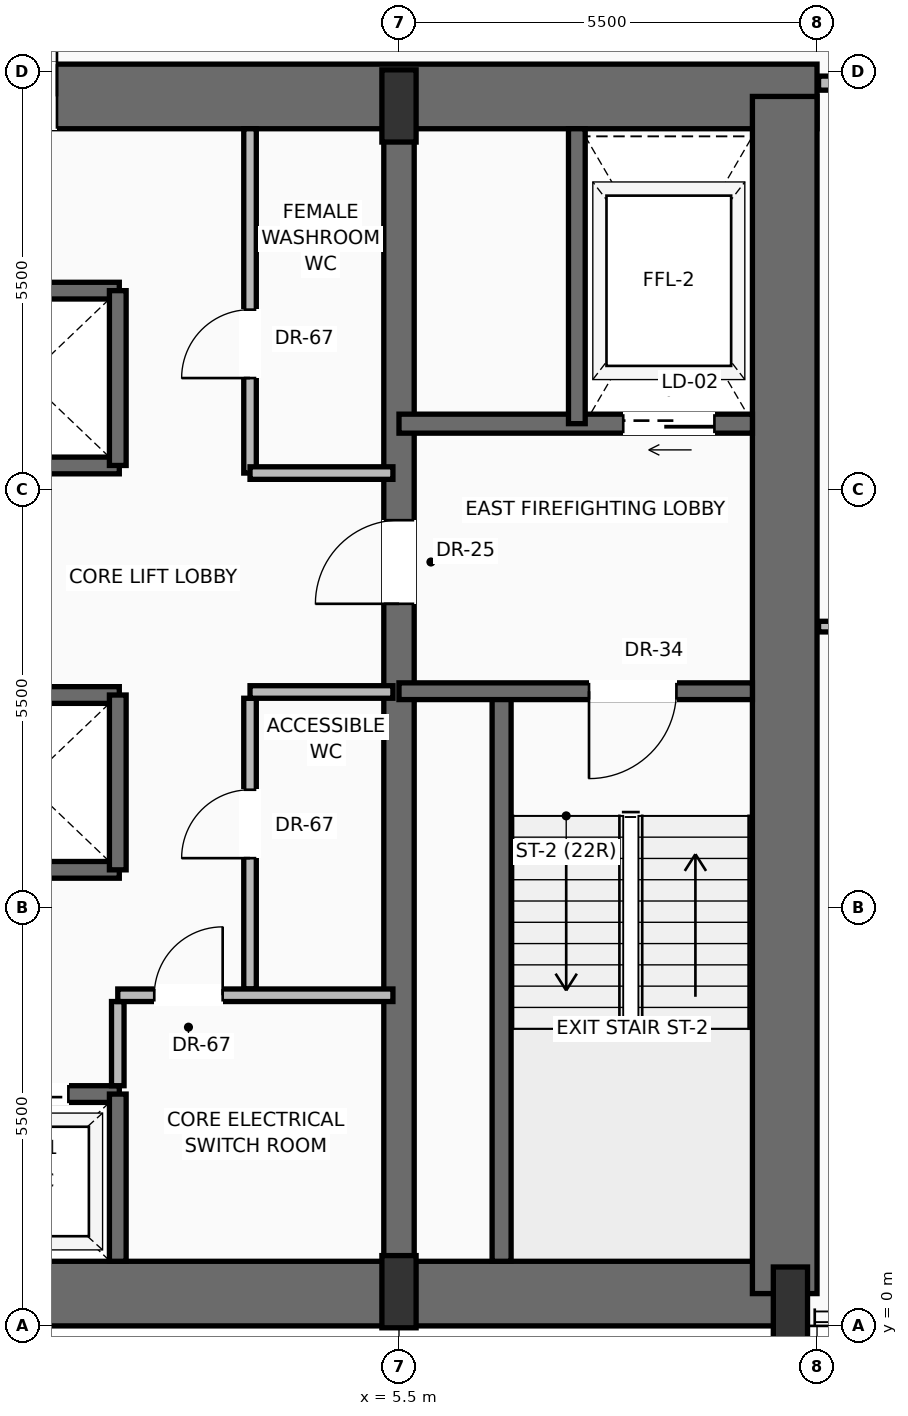
"""IFC4 building model, lengths in metres.
Left out: names, types, materials, properties, quantities, classifications, styles, units other than length and angle.
Written with IfcOpenShell. Run it as: python <this file> out.ifc"""

import sys

from ifc_helpers import new_model, si_unit, direction, frame, frame_2d, origin, origin_2d, place, context, subcontext, project, spatial, rectangle, extrude, source, transform, mapped, element, fill, save


model = new_model("IFC4")
c1 = context("Model", 3, precision=1e-05, world=origin(), true_north=direction((0.0, 1.0)))
c2 = subcontext(c1, "Body", "Model", "MODEL_VIEW")
j1 = project(units=[si_unit("LENGTHUNIT", "METRE"), si_unit("PLANEANGLEUNIT", "RADIAN")], contexts=[c1])
p1 = place(None, origin())
s1 = spatial("IfcSite", under=j1, at=p1, CompositionType="ELEMENT")
p2 = place(p1, origin())
s2 = spatial("IfcBuilding", under=s1, at=p2, CompositionType="ELEMENT")
p3 = place(p2, frame((0.0, 0.0, 64.5)))
s3 = spatial("IfcBuildingStorey", under=s2, at=p3, CompositionType="ELEMENT", Elevation=64.5)
p4 = place(p3, frame((-10.65, 0.425, 0.0), z_axis=(0.0, 0.0, 1.0), x_axis=(1.0, 0.0, 0.0)))
e1 = element("IfcWall", 1, at=p4, inside=s3, PredefinedType="SHEAR", context=c2, shape_type="SweptSolid", body=[
    extrude(rectangle(XDim=21.3, YDim=0.85, at=frame_2d((10.65, 0.0))), origin(), (0.0, 0.0, 1.0), 3.45),
])
p5 = place(p3, frame((-11.0, 16.175, 0.0), z_axis=(0.0, 0.0, 1.0), x_axis=(1.0, 0.0, 0.0)))
e2 = element("IfcWall", 2, at=p5, inside=s3, PredefinedType="SHEAR", context=c2, shape_type="SweptSolid", body=[
    extrude(rectangle(XDim=22.0, YDim=0.85, at=frame_2d((11.0, 0.0))), origin(), (0.0, 0.0, 1.0), 3.45),
])
p6 = place(p5, frame((3.57, 0.0, 0.0)))
e3 = element("IfcOpeningElement", 3, at=p6, cuts=e2, PredefinedType="OPENING", context=c2, shape_type="SweptSolid", body=[
    extrude(rectangle(XDim=1.3, YDim=2.3, at=frame_2d((0.65, 1.15))), frame((0.0, 0.435, 0.0), z_axis=(0.0, -1.0, 0.0), x_axis=(1.0, 0.0, 0.0)), (0.0, 0.0, 1.0), 0.87),
])
p7 = place(p5, frame((10.0, 0.0, 0.0)))
e4 = element("IfcOpeningElement", 4, at=p7, cuts=e2, PredefinedType="OPENING", context=c2, shape_type="SweptSolid", body=[
    extrude(rectangle(XDim=2.0, YDim=2.4, at=frame_2d((1.0, 1.2))), frame((0.0, 0.435, 0.0), z_axis=(0.0, -1.0, 0.0), x_axis=(1.0, 0.0, 0.0)), (0.0, 0.0, 1.0), 0.87),
])
p8 = place(p3, frame((10.575, 0.425, 0.0), z_axis=(0.0, 0.0, 1.0), x_axis=(0.0, 1.0, 0.0)))
e5 = element("IfcWall", 5, at=p8, inside=s3, PredefinedType="SHEAR", context=c2, shape_type="SweptSolid", body=[
    extrude(rectangle(XDim=15.75, YDim=0.85, at=frame_2d((7.875, 0.0))), origin(), (0.0, 0.0, 1.0), 3.45),
])
p9 = place(p3, frame((5.5, 0.425, 0.0), z_axis=(0.0, 0.0, 1.0), x_axis=(0.0, 1.0, 0.0)))
e6 = element("IfcWall", 6, at=p9, inside=s3, PredefinedType="SHEAR", context=c2, shape_type="SweptSolid", body=[
    extrude(rectangle(XDim=15.75, YDim=0.4, at=frame_2d((7.875, 0.0))), origin(), (0.0, 0.0, 1.0), 3.45),
])
p10 = place(p9, frame((9.075, 0.0, 0.0)))
e7 = element("IfcOpeningElement", 7, at=p10, cuts=e6, PredefinedType="OPENING", context=c2, shape_type="SweptSolid", body=[
    extrude(rectangle(XDim=1.1, YDim=2.2, at=frame_2d((0.55, 1.1))), frame((0.0, 0.21, 0.0), z_axis=(0.0, -1.0, 0.0), x_axis=(1.0, 0.0, 0.0)), (0.0, 0.0, 1.0), 0.42),
])
m1 = source(origin(), c2, "Body", "SweptSolid", [
    extrude(rectangle(XDim=0.45, YDim=0.95, at=origin_2d()), origin(), (0.0, 0.0, 1.0), 3.7),
])
for number, where, z_axis, x_axis in (
    (8, (5.5, 0.45, 0.0), (0.0, 0.0, 1.0), (1.0, 0.0, 0.0)),
    (9, (10.65, 0.3, 0.0), (0.0, 0.0, 1.0), (1.0, 0.0, 0.0)),
    (10, (5.5, 16.05, 0.0), (0.0, 0.0, 1.0), (1.0, 0.0, 0.0)),
):
    element("IfcColumn", number, at=place(p3, frame(where, z_axis=z_axis, x_axis=x_axis)), inside=s3, PredefinedType="PILASTER", context=c2, shape_type="MappedRepresentation", body=[
        mapped(m1, transform((0.0, 0.0, 0.0), scale=1.0)),
    ])
p11 = place(p3, frame((6.85, 0.85, 0.0), z_axis=(0.0, 0.0, 1.0), x_axis=(0.0, 1.0, 0.0)))
e11 = element("IfcWall", 11, at=p11, inside=s3, PredefinedType="SOLIDWALL", context=c2, shape_type="SweptSolid", body=[
    extrude(rectangle(XDim=7.5, YDim=0.25, at=frame_2d((3.75, 0.0))), origin(), (0.0, 0.0, 1.0), 3.45),
])
p12 = place(p3, frame((10.15, 8.35, 0.0), z_axis=(0.0, 0.0, 1.0), x_axis=(-1.0, 0.0, 0.0)))
e12 = element("IfcWall", 12, at=p12, inside=s3, PredefinedType="SOLIDWALL", context=c2, shape_type="SweptSolid", body=[
    extrude(rectangle(XDim=4.65, YDim=0.22, at=frame_2d((2.325, 0.0))), origin(), (0.0, 0.0, 1.0), 3.45),
])
p13 = place(p12, frame((1.0, 0.0, 0.0)))
e13 = element("IfcOpeningElement", 13, at=p13, cuts=e12, PredefinedType="OPENING", context=c2, shape_type="SweptSolid", body=[
    extrude(rectangle(XDim=1.15, YDim=2.2, at=frame_2d((0.575, 1.1))), frame((0.0, 0.12, 0.0), z_axis=(0.0, -1.0, 0.0), x_axis=(1.0, 0.0, 0.0)), (0.0, 0.0, 1.0), 0.24),
])
p14 = place(p3, frame((10.15, 11.87, 0.0), z_axis=(0.0, 0.0, 1.0), x_axis=(-1.0, 0.0, 0.0)))
e14 = element("IfcWall", 14, at=p14, inside=s3, PredefinedType="SOLIDWALL", context=c2, shape_type="SweptSolid", body=[
    extrude(rectangle(XDim=4.65, YDim=0.25, at=frame_2d((2.325, 0.0))), origin(), (0.0, 0.0, 1.0), 3.45),
])
p15 = place(p14, frame((0.5, 0.0, 0.0)))
e15 = element("IfcOpeningElement", 15, at=p15, cuts=e14, PredefinedType="OPENING", context=c2, shape_type="SweptSolid", body=[
    extrude(rectangle(XDim=1.2, YDim=2.25, at=frame_2d((0.6, 1.125))), frame((0.0, 0.135, 0.0), z_axis=(0.0, -1.0, 0.0), x_axis=(1.0, 0.0, 0.0)), (0.0, 0.0, 1.0), 0.27),
])
p16 = place(p3, frame((7.84, 11.87, 0.0), z_axis=(0.0, 0.0, 1.0), x_axis=(0.0, 1.0, 0.0)))
e16 = element("IfcWall", 16, at=p16, inside=s3, PredefinedType="SOLIDWALL", context=c2, shape_type="SweptSolid", body=[
    extrude(rectangle(XDim=3.88, YDim=0.22, at=frame_2d((1.94, 0.0))), origin(), (0.0, 0.0, 1.0), 3.45),
])
p17 = place(p3, frame((-5.5, 3.05, 0.0), z_axis=(0.0, 0.0, 1.0), x_axis=(1.0, 0.0, 0.0)))
e17 = element("IfcWall", 17, at=p17, inside=s3, PredefinedType="SOLIDWALL", context=c2, shape_type="SweptSolid", body=[
    extrude(rectangle(XDim=7.32, YDim=0.22, at=frame_2d((3.66, 0.0))), origin(), (0.0, 0.0, 1.0), 3.45),
])
p18 = place(p17, frame((0.75, 0.0, 0.0)))
e18 = element("IfcOpeningElement", 18, at=p18, cuts=e17, PredefinedType="OPENING", context=c2, shape_type="SweptSolid", body=[
    extrude(rectangle(XDim=1.1, YDim=2.2, at=frame_2d((0.55, 1.1))), frame((0.0, 0.12, 0.0), z_axis=(0.0, -1.0, 0.0), x_axis=(1.0, 0.0, 0.0)), (0.0, 0.0, 1.0), 0.24),
])
p19 = place(p17, frame((3.15, 0.0, 0.0)))
e19 = element("IfcOpeningElement", 19, at=p19, cuts=e17, PredefinedType="OPENING", context=c2, shape_type="SweptSolid", body=[
    extrude(rectangle(XDim=1.1, YDim=2.2, at=frame_2d((0.55, 1.1))), frame((0.0, 0.12, 0.0), z_axis=(0.0, -1.0, 0.0), x_axis=(1.0, 0.0, 0.0)), (0.0, 0.0, 1.0), 0.24),
])
p20 = place(p17, frame((5.55, 0.0, 0.0)))
e20 = element("IfcOpeningElement", 20, at=p20, cuts=e17, PredefinedType="OPENING", context=c2, shape_type="SweptSolid", body=[
    extrude(rectangle(XDim=1.1, YDim=2.2, at=frame_2d((0.55, 1.1))), frame((0.0, 0.12, 0.0), z_axis=(0.0, -1.0, 0.0), x_axis=(1.0, 0.0, 0.0)), (0.0, 0.0, 1.0), 0.24),
])
p21 = place(p3, frame((1.8, 0.85, 0.0), z_axis=(0.0, 0.0, 1.0), x_axis=(0.0, 1.0, 0.0)))
e21 = element("IfcWall", 21, at=p21, inside=s3, PredefinedType="SOLIDWALL", context=c2, shape_type="SweptSolid", body=[
    extrude(rectangle(XDim=2.2, YDim=0.22, at=frame_2d((1.1, 0.0))), origin(), (0.0, 0.0, 1.0), 3.45),
])
p22 = place(p3, frame((1.8, 3.16, 0.0), z_axis=(0.0, 0.0, 1.0), x_axis=(0.0, 1.0, 0.0)))
e22 = element("IfcWall", 22, at=p22, inside=s3, PredefinedType="PARTITIONING", context=c2, shape_type="SweptSolid", body=[
    extrude(rectangle(XDim=1.108, YDim=0.165, at=frame_2d((0.554, 0.0))), origin(), (0.0, 0.0, 1.0), 3.442),
])
p23 = place(p3, frame((3.54, 4.433, 0.0), z_axis=(0.0, 0.0, 1.0), x_axis=(0.0, 1.0, 0.0)))
e23 = element("IfcWall", 23, at=p23, inside=s3, PredefinedType="PARTITIONING", context=c2, shape_type="SweptSolid", body=[
    extrude(rectangle(XDim=3.825, YDim=0.165, at=frame_2d((1.913, 0.0))), origin(), (0.0, 0.0, 1.0), 3.442),
])
p24 = place(p23, frame((1.721, 0.0, 0.0)))
e24 = element("IfcOpeningElement", 24, at=p24, cuts=e23, PredefinedType="OPENING", context=c2, shape_type="SweptSolid", body=[
    extrude(rectangle(XDim=0.9, YDim=2.1, at=frame_2d((0.45, 1.05))), frame((0.0, 0.093, 0.0), z_axis=(0.0, -1.0, 0.0), x_axis=(1.0, 0.0, 0.0)), (0.0, 0.0, 1.0), 0.185),
])
p25 = place(p3, frame((3.54, 8.34, 0.0), z_axis=(0.0, 0.0, 1.0), x_axis=(1.0, 0.0, 0.0)))
e25 = element("IfcWall", 25, at=p25, inside=s3, PredefinedType="PARTITIONING", context=c2, shape_type="SweptSolid", body=[
    extrude(rectangle(XDim=1.88, YDim=0.165, at=frame_2d((0.94, 0.0))), origin(), (0.0, 0.0, 1.0), 3.442),
])
p26 = place(p3, frame((1.8, 4.35, 0.0), z_axis=(0.0, 0.0, 1.0), x_axis=(1.0, 0.0, 0.0)))
e26 = element("IfcWall", 26, at=p26, inside=s3, PredefinedType="PARTITIONING", context=c2, shape_type="SweptSolid", body=[
    extrude(rectangle(XDim=3.62, YDim=0.165, at=frame_2d((1.81, 0.0))), origin(), (0.0, 0.0, 1.0), 3.442),
])
p27 = place(p26, frame((0.48, 0.0, 0.0)))
e27 = element("IfcOpeningElement", 27, at=p27, cuts=e26, PredefinedType="OPENING", context=c2, shape_type="SweptSolid", body=[
    extrude(rectangle(XDim=0.9, YDim=2.1, at=frame_2d((0.45, 1.05))), frame((0.0, 0.093, 0.0), z_axis=(0.0, -1.0, 0.0), x_axis=(1.0, 0.0, 0.0)), (0.0, 0.0, 1.0), 0.185),
])
for number, where, z_axis, x_axis in (
    (28, (-5.5, 6.0, 0.0), (0.0, 0.0, 1.0), (1.0, 0.0, 0.0)),
    (29, (-5.5, 8.3, 0.0), (0.0, 0.0, 1.0), (1.0, 0.0, 0.0)),
):
    element("IfcWall", number, at=place(p3, frame(where, z_axis=z_axis, x_axis=x_axis)), inside=s3, PredefinedType="SOLIDWALL", context=c2, shape_type="SweptSolid", body=[
        extrude(rectangle(XDim=7.32, YDim=0.22, at=frame_2d((3.66, 0.0))), origin(), (0.0, 0.0, 1.0), 3.45),
    ])
p28 = place(p3, frame((1.8, 6.0, 0.0), z_axis=(0.0, 0.0, 1.0), x_axis=(0.0, 1.0, 0.0)))
e30 = element("IfcWall", 30, at=p28, inside=s3, PredefinedType="SOLIDWALL", context=c2, shape_type="SweptSolid", body=[
    extrude(rectangle(XDim=2.3, YDim=0.22, at=frame_2d((1.15, 0.0))), origin(), (0.0, 0.0, 1.0), 3.45),
])
for number, where, z_axis, x_axis in (
    (31, (-5.5, 11.32, 0.0), (0.0, 0.0, 1.0), (1.0, 0.0, 0.0)),
    (32, (-5.5, 13.62, 0.0), (0.0, 0.0, 1.0), (1.0, 0.0, 0.0)),
):
    element("IfcWall", number, at=place(p3, frame(where, z_axis=z_axis, x_axis=x_axis)), inside=s3, PredefinedType="SOLIDWALL", context=c2, shape_type="SweptSolid", body=[
        extrude(rectangle(XDim=7.32, YDim=0.22, at=frame_2d((3.66, 0.0))), origin(), (0.0, 0.0, 1.0), 3.45),
    ])
p29 = place(p3, frame((1.8, 11.32, 0.0), z_axis=(0.0, 0.0, 1.0), x_axis=(0.0, 1.0, 0.0)))
e33 = element("IfcWall", 33, at=p29, inside=s3, PredefinedType="SOLIDWALL", context=c2, shape_type="SweptSolid", body=[
    extrude(rectangle(XDim=2.3, YDim=0.22, at=frame_2d((1.15, 0.0))), origin(), (0.0, 0.0, 1.0), 3.45),
])
p30 = place(p3, frame((3.54, 11.22, 0.0), z_axis=(0.0, 0.0, 1.0), x_axis=(0.0, 1.0, 0.0)))
e34 = element("IfcWall", 34, at=p30, inside=s3, PredefinedType="PARTITIONING", context=c2, shape_type="SweptSolid", body=[
    extrude(rectangle(XDim=4.53, YDim=0.165, at=frame_2d((2.265, 0.0))), origin(), (0.0, 0.0, 1.0), 3.442),
])
p31 = place(p30, frame((1.25, 0.0, 0.0)))
e35 = element("IfcOpeningElement", 35, at=p31, cuts=e34, PredefinedType="OPENING", context=c2, shape_type="SweptSolid", body=[
    extrude(rectangle(XDim=0.9, YDim=2.1, at=frame_2d((0.45, 1.05))), frame((0.0, 0.093, 0.0), z_axis=(0.0, -1.0, 0.0), x_axis=(1.0, 0.0, 0.0)), (0.0, 0.0, 1.0), 0.185),
])
p32 = place(p3, frame((3.54, 11.22, 0.0), z_axis=(0.0, 0.0, 1.0), x_axis=(1.0, 0.0, 0.0)))
e36 = element("IfcWall", 36, at=p32, inside=s3, PredefinedType="PARTITIONING", context=c2, shape_type="SweptSolid", body=[
    extrude(rectangle(XDim=1.88, YDim=0.165, at=frame_2d((0.94, 0.0))), origin(), (0.0, 0.0, 1.0), 3.442),
])
p33 = place(p3, frame((11.02, 16.35, 0.0), z_axis=(0.0, 0.0, 1.0), x_axis=(1.0, 0.0, 0.0)))
e37 = element("IfcWall", 37, at=p33, inside=s3, PredefinedType="PARTITIONING", context=c2, shape_type="SweptSolid", body=[
    extrude(rectangle(XDim=13.294, YDim=0.185, at=frame_2d((6.647, 0.0))), origin(), (0.0, 0.0, 1.0), 2.747),
])
p34 = place(p33, frame((6.803, 0.0, 0.0)))
e38 = element("IfcOpeningElement", 38, at=p34, cuts=e37, PredefinedType="OPENING", context=c2, shape_type="SweptSolid", body=[
    extrude(rectangle(XDim=0.95, YDim=2.2, at=frame_2d((0.475, 1.1))), frame((0.0, 0.103, 0.0), z_axis=(0.0, -1.0, 0.0), x_axis=(1.0, 0.0, 0.0)), (0.0, 0.0, 1.0), 0.205),
])
p35 = place(p3, frame((11.02, 9.2, 0.0), z_axis=(0.0, 0.0, 1.0), x_axis=(1.0, 0.0, 0.0)))
e39 = element("IfcWall", 39, at=p35, inside=s3, PredefinedType="PARTITIONING", context=c2, shape_type="SweptSolid", body=[
    extrude(rectangle(XDim=16.893, YDim=0.14, at=frame_2d((8.446, 0.0))), origin(), (0.0, 0.0, 1.0), 3.442),
])
p36 = place(p35, frame((7.959, 0.0, 0.0)))
e40 = element("IfcOpeningElement", 40, at=p36, cuts=e39, PredefinedType="OPENING", context=c2, shape_type="SweptSolid", body=[
    extrude(rectangle(XDim=0.95, YDim=2.2, at=frame_2d((0.475, 1.1))), frame((0.0, 0.08, 0.0), z_axis=(0.0, -1.0, 0.0), x_axis=(1.0, 0.0, 0.0)), (0.0, 0.0, 1.0), 0.16),
])
m2 = source(origin(), c2, "Body", "SweptSolid", [
    extrude(rectangle(XDim=1.15, YDim=2.2, at=frame_2d((0.575, 1.1))), frame((0.0, 0.025, 0.0), z_axis=(0.0, -1.0, 0.0), x_axis=(1.0, 0.0, 0.0)), (0.0, 0.0, 1.0), 0.05),
])
p37 = place(p13, origin())
e41 = element("IfcDoor", 41, at=p37, inside=s3, OperationType="SINGLE_SWING_RIGHT", PredefinedType="DOOR", context=c2, shape_type="MappedRepresentation", body=[
    mapped(m2, transform((0.0, 0.0, 0.0), scale=1.0)),
])
fill(e13, e41)
m3 = source(origin(), c2, "Body", "SweptSolid", [
    extrude(rectangle(XDim=1.1, YDim=2.2, at=frame_2d((0.55, 1.1))), frame((0.0, 0.025, 0.0), z_axis=(0.0, -1.0, 0.0), x_axis=(1.0, 0.0, 0.0)), (0.0, 0.0, 1.0), 0.05),
])
p38 = place(p10, origin())
e42 = element("IfcDoor", 42, at=p38, inside=s3, OperationType="SINGLE_SWING_LEFT", PredefinedType="DOOR", context=c2, shape_type="MappedRepresentation", body=[
    mapped(m3, transform((0.0, 0.0, 0.0), scale=1.0)),
])
fill(e7, e42)
m4 = source(origin(), c2, "Body", "SweptSolid", [
    extrude(rectangle(XDim=1.2, YDim=2.25, at=frame_2d((0.6, 1.125))), frame((0.0, 0.025, 0.0), z_axis=(0.0, -1.0, 0.0), x_axis=(1.0, 0.0, 0.0)), (0.0, 0.0, 1.0), 0.05),
])
p39 = place(p15, origin())
e43 = element("IfcDoor", 43, at=p39, inside=s3, OperationType="SLIDING_TO_RIGHT", PredefinedType="DOOR", context=c2, shape_type="MappedRepresentation", body=[
    mapped(m4, transform((0.0, 0.0, 0.0), scale=1.0)),
])
fill(e15, e43)
m5 = source(origin(), c2, "Body", "SweptSolid", [
    extrude(rectangle(XDim=2.0, YDim=2.4, at=frame_2d((1.0, 1.2))), frame((0.0, 0.025, 0.0), z_axis=(0.0, -1.0, 0.0), x_axis=(1.0, 0.0, 0.0)), (0.0, 0.0, 1.0), 0.05),
])
p40 = place(p7, origin())
e44 = element("IfcDoor", 44, at=p40, inside=s3, OperationType="DOUBLE_DOOR_SINGLE_SWING", PredefinedType="DOOR", context=c2, shape_type="MappedRepresentation", body=[
    mapped(m5, transform((0.0, 0.0, 0.0), scale=1.0)),
])
fill(e4, e44)
m6 = source(origin(), c2, "Body", "SweptSolid", [
    extrude(rectangle(XDim=1.1, YDim=2.2, at=frame_2d((0.55, 1.1))), frame((0.0, 0.025, 0.0), z_axis=(0.0, -1.0, 0.0), x_axis=(1.0, 0.0, 0.0)), (0.0, 0.0, 1.0), 0.05),
])
p41 = place(p20, origin())
e45 = element("IfcDoor", 45, at=p41, inside=s3, OperationType="SLIDING_TO_RIGHT", PredefinedType="DOOR", context=c2, shape_type="MappedRepresentation", body=[
    mapped(m6, transform((0.0, 0.0, 0.0), scale=1.0)),
])
fill(e20, e45)
m7 = source(origin(), c2, "Body", "SweptSolid", [
    extrude(rectangle(XDim=0.9, YDim=2.1, at=frame_2d((0.45, 1.05))), frame((0.0, 0.025, 0.0), z_axis=(0.0, -1.0, 0.0), x_axis=(1.0, 0.0, 0.0)), (0.0, 0.0, 1.0), 0.05),
])
p42 = place(p27, origin())
e46 = element("IfcDoor", 46, at=p42, inside=s3, OperationType="SINGLE_SWING_RIGHT", PredefinedType="DOOR", context=c2, shape_type="MappedRepresentation", body=[
    mapped(m7, transform((0.0, 0.0, 0.0), scale=1.0)),
])
fill(e27, e46)
p43 = place(p24, origin())
e47 = element("IfcDoor", 47, at=p43, inside=s3, OperationType="SINGLE_SWING_LEFT", PredefinedType="DOOR", context=c2, shape_type="MappedRepresentation", body=[
    mapped(m7, transform((0.0, 0.0, 0.0), scale=1.0)),
])
fill(e24, e47)
p44 = place(p31, origin())
e48 = element("IfcDoor", 48, at=p44, inside=s3, OperationType="SINGLE_SWING_LEFT", PredefinedType="DOOR", context=c2, shape_type="MappedRepresentation", body=[
    mapped(m7, transform((0.0, 0.0, 0.0), scale=1.0)),
])
fill(e35, e48)
save(model, sys.argv[1])
